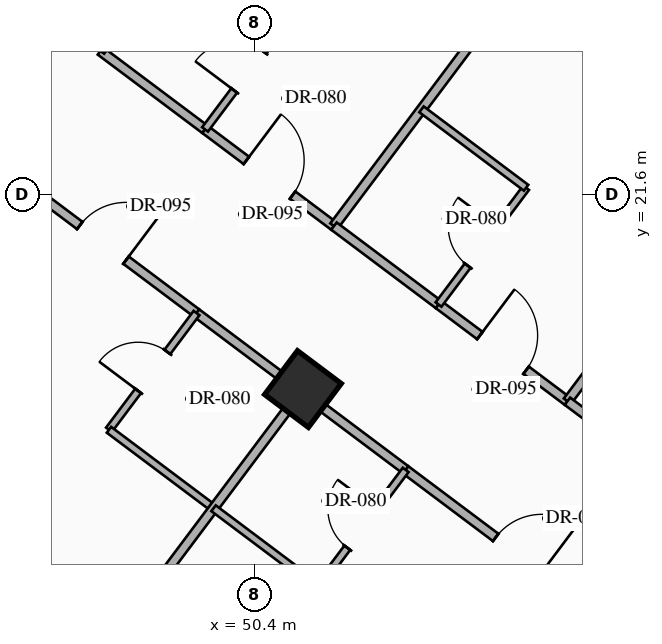
"""IFC4 building model, lengths in metres.
Left out: names, types, materials, properties, quantities, classifications, styles, units other than length and angle.
Written with IfcOpenShell. Run it as: python <this file> out.ifc"""

import sys

from ifc_helpers import new_model, si_unit, direction, frame, frame_2d, origin, origin_2d, place, context, subcontext, project, spatial, rectangle, hollow_rectangle, extrude, element, fill, save


model = new_model("IFC4")
c1 = context("Model", 3, precision=1e-05, world=origin(), true_north=direction((0.0, 1.0)))
c2 = subcontext(c1, "Body", "Model", "MODEL_VIEW")
j1 = project(units=[si_unit("LENGTHUNIT", "METRE"), si_unit("PLANEANGLEUNIT", "RADIAN")], contexts=[c1])
p1 = place(None, origin())
s1 = spatial("IfcSite", under=j1, at=p1, CompositionType="ELEMENT")
p2 = place(p1, origin())
s2 = spatial("IfcBuilding", under=s1, at=p2, CompositionType="ELEMENT")
p3 = place(p2, frame((0.0, 0.0, 74.6)))
s3 = spatial("IfcBuildingStorey", under=s2, at=p3, CompositionType="ELEMENT", Elevation=74.6)
p4 = place(p3, frame((51.2, 18.4, 0.0), z_axis=(0.0, 0.0, 1.0), x_axis=(0.799999996291, -0.600000004945, 0.0)))
e1 = element("IfcColumn", 1, at=p4, inside=s3, PredefinedType="COLUMN", context=c2, shape_type="SweptSolid", body=[
    extrude(hollow_rectangle(XDim=0.9, YDim=0.9, WallThickness=0.036, at=origin_2d()), origin(), (0.0, 0.0, 1.0), 3.35),
])
p5 = place(p3, frame((44.86, 40.73, 0.0), z_axis=(0.0, 0.0, 1.0), x_axis=(0.800006902154, -0.599990797017, 0.0)))
e2 = element("IfcWall", 2, at=p5, inside=s3, PredefinedType="STANDARD", context=c2, shape_type="SweptSolid", body=[
    extrude(rectangle(XDim=29.712, YDim=0.28, at=frame_2d((14.856, 0.0))), origin(), (0.0, 0.0, 1.0), 3.13),
])
p6 = place(p5, frame((14.249, 0.0, 0.0)))
e3 = element("IfcOpeningElement", 3, at=p6, cuts=e2, PredefinedType="OPENING", context=c2, shape_type="SweptSolid", body=[
    extrude(rectangle(XDim=1.1, YDim=2.2, at=frame_2d((0.55, 1.1))), frame((0.0, 0.15, 0.0), z_axis=(0.0, -1.0, 0.0), x_axis=(1.0, 0.0, 0.0)), (0.0, 0.0, 1.0), 0.3),
])
p7 = place(p5, frame((1.612, 0.0, 0.85)))
e4 = element("IfcOpeningElement", 4, at=p7, cuts=e2, PredefinedType="OPENING", context=c2, shape_type="SweptSolid", body=[
    extrude(rectangle(XDim=1.4, YDim=1.8, at=frame_2d((0.7, 0.9))), frame((0.0, 0.15, 0.0), z_axis=(0.0, -1.0, 0.0), x_axis=(1.0, 0.0, 0.0)), (0.0, 0.0, 1.0), 0.3),
])
p8 = place(p5, frame((5.667, 0.0, 0.85)))
e5 = element("IfcOpeningElement", 5, at=p8, cuts=e2, PredefinedType="OPENING", context=c2, shape_type="SweptSolid", body=[
    extrude(rectangle(XDim=1.4, YDim=1.8, at=frame_2d((0.7, 0.9))), frame((0.0, 0.15, 0.0), z_axis=(0.0, -1.0, 0.0), x_axis=(1.0, 0.0, 0.0)), (0.0, 0.0, 1.0), 0.3),
])
p9 = place(p5, frame((9.912, 0.0, 0.85)))
e6 = element("IfcOpeningElement", 6, at=p9, cuts=e2, PredefinedType="OPENING", context=c2, shape_type="SweptSolid", body=[
    extrude(rectangle(XDim=1.4, YDim=1.8, at=frame_2d((0.7, 0.9))), frame((0.0, 0.15, 0.0), z_axis=(0.0, -1.0, 0.0), x_axis=(1.0, 0.0, 0.0)), (0.0, 0.0, 1.0), 0.3),
])
p10 = place(p5, frame((19.528, 0.0, 0.85)))
e7 = element("IfcOpeningElement", 7, at=p10, cuts=e2, PredefinedType="OPENING", context=c2, shape_type="SweptSolid", body=[
    extrude(rectangle(XDim=1.4, YDim=1.8, at=frame_2d((0.7, 0.9))), frame((0.0, 0.15, 0.0), z_axis=(0.0, -1.0, 0.0), x_axis=(1.0, 0.0, 0.0)), (0.0, 0.0, 1.0), 0.3),
])
p11 = place(p5, frame((23.451, 0.0, 0.85)))
e8 = element("IfcOpeningElement", 8, at=p11, cuts=e2, PredefinedType="OPENING", context=c2, shape_type="SweptSolid", body=[
    extrude(rectangle(XDim=1.4, YDim=1.8, at=frame_2d((0.7, 0.9))), frame((0.0, 0.15, 0.0), z_axis=(0.0, -1.0, 0.0), x_axis=(1.0, 0.0, 0.0)), (0.0, 0.0, 1.0), 0.3),
])
p12 = place(p5, frame((27.852, 0.0, 0.85)))
e9 = element("IfcOpeningElement", 9, at=p12, cuts=e2, PredefinedType="OPENING", context=c2, shape_type="SweptSolid", body=[
    extrude(rectangle(XDim=1.4, YDim=1.8, at=frame_2d((0.7, 0.9))), frame((0.0, 0.15, 0.0), z_axis=(0.0, -1.0, 0.0), x_axis=(1.0, 0.0, 0.0)), (0.0, 0.0, 1.0), 0.3),
])
p13 = place(p3, frame((53.318, 2.487, 0.0), z_axis=(0.0, 0.0, 1.0), x_axis=(-0.800004174678, 0.599994433723, 0.0)))
e10 = element("IfcWall", 10, at=p13, inside=s3, PredefinedType="STANDARD", context=c2, shape_type="SweptSolid", body=[
    extrude(rectangle(XDim=35.089, YDim=0.28, at=frame_2d((17.544, 0.0))), origin(), (0.0, 0.0, 1.0), 3.13),
])
p14 = place(p13, frame((1.931, 0.0, 0.85)))
e11 = element("IfcOpeningElement", 11, at=p14, cuts=e10, PredefinedType="OPENING", context=c2, shape_type="SweptSolid", body=[
    extrude(rectangle(XDim=1.4, YDim=1.8, at=frame_2d((0.7, 0.9))), frame((0.0, 0.15, 0.0), z_axis=(0.0, -1.0, 0.0), x_axis=(1.0, 0.0, 0.0)), (0.0, 0.0, 1.0), 0.3),
])
p15 = place(p13, frame((6.819, 0.0, 0.85)))
e12 = element("IfcOpeningElement", 12, at=p15, cuts=e10, PredefinedType="OPENING", context=c2, shape_type="SweptSolid", body=[
    extrude(rectangle(XDim=1.4, YDim=1.8, at=frame_2d((0.7, 0.9))), frame((0.0, 0.15, 0.0), z_axis=(0.0, -1.0, 0.0), x_axis=(1.0, 0.0, 0.0)), (0.0, 0.0, 1.0), 0.3),
])
p16 = place(p13, frame((11.832, 0.0, 0.85)))
e13 = element("IfcOpeningElement", 13, at=p16, cuts=e10, PredefinedType="OPENING", context=c2, shape_type="SweptSolid", body=[
    extrude(rectangle(XDim=1.4, YDim=1.8, at=frame_2d((0.7, 0.9))), frame((0.0, 0.15, 0.0), z_axis=(0.0, -1.0, 0.0), x_axis=(1.0, 0.0, 0.0)), (0.0, 0.0, 1.0), 0.3),
])
p17 = place(p13, frame((17.647, 0.0, 0.85)))
e14 = element("IfcOpeningElement", 14, at=p17, cuts=e10, PredefinedType="OPENING", context=c2, shape_type="SweptSolid", body=[
    extrude(rectangle(XDim=1.4, YDim=1.8, at=frame_2d((0.7, 0.9))), frame((0.0, 0.15, 0.0), z_axis=(0.0, -1.0, 0.0), x_axis=(1.0, 0.0, 0.0)), (0.0, 0.0, 1.0), 0.3),
])
p18 = place(p13, frame((21.857, 0.0, 0.85)))
e15 = element("IfcOpeningElement", 15, at=p18, cuts=e10, PredefinedType="OPENING", context=c2, shape_type="SweptSolid", body=[
    extrude(rectangle(XDim=1.4, YDim=1.8, at=frame_2d((0.7, 0.9))), frame((0.0, 0.15, 0.0), z_axis=(0.0, -1.0, 0.0), x_axis=(1.0, 0.0, 0.0)), (0.0, 0.0, 1.0), 0.3),
])
p19 = place(p13, frame((26.87, 0.0, 0.85)))
e16 = element("IfcOpeningElement", 16, at=p19, cuts=e10, PredefinedType="OPENING", context=c2, shape_type="SweptSolid", body=[
    extrude(rectangle(XDim=1.4, YDim=1.8, at=frame_2d((0.7, 0.9))), frame((0.0, 0.15, 0.0), z_axis=(0.0, -1.0, 0.0), x_axis=(1.0, 0.0, 0.0)), (0.0, 0.0, 1.0), 0.3),
])
p20 = place(p13, frame((31.757, 0.0, 0.85)))
e17 = element("IfcOpeningElement", 17, at=p20, cuts=e10, PredefinedType="OPENING", context=c2, shape_type="SweptSolid", body=[
    extrude(rectangle(XDim=1.4, YDim=1.8, at=frame_2d((0.7, 0.9))), frame((0.0, 0.15, 0.0), z_axis=(0.0, -1.0, 0.0), x_axis=(1.0, 0.0, 0.0)), (0.0, 0.0, 1.0), 0.3),
])
p21 = place(p3, frame((47.87, 23.96, 0.0), z_axis=(0.0, 0.0, 1.0), x_axis=(0.79998637334, -0.60001816845, 0.0)))
e18 = element("IfcWall", 18, at=p21, inside=s3, PredefinedType="PARTITIONING", context=c2, shape_type="SweptSolid", body=[
    extrude(rectangle(XDim=2.15, YDim=0.15, at=frame_2d((1.075, 0.0))), origin(), (0.0, 0.0, 1.0), 2.775),
])
p22 = place(p3, frame((49.59, 22.67, 0.0), z_axis=(0.0, 0.0, 1.0), x_axis=(0.800011056104, -0.599985258246, 0.0)))
e19 = element("IfcWall", 19, at=p22, inside=s3, PredefinedType="PARTITIONING", context=c2, shape_type="SweptSolid", body=[
    extrude(rectangle(XDim=2.65, YDim=0.15, at=frame_2d((1.325, 0.0))), origin(), (0.0, 0.0, 1.0), 2.775),
])
p23 = place(p22, frame((0.85, 0.0, 0.0)))
e20 = element("IfcOpeningElement", 20, at=p23, cuts=e19, PredefinedType="OPENING", context=c2, shape_type="SweptSolid", body=[
    extrude(rectangle(XDim=0.95, YDim=2.15, at=frame_2d((0.475, 1.075))), frame((0.0, 0.085, 0.0), z_axis=(0.0, -1.0, 0.0), x_axis=(1.0, 0.0, 0.0)), (0.0, 0.0, 1.0), 0.17),
])
p24 = place(p3, frame((49.59, 22.67, 0.0), z_axis=(0.0, 0.0, 1.0), x_axis=(0.599951172744, 0.800036618114, 0.0)))
e21 = element("IfcWall", 21, at=p24, inside=s3, PredefinedType="PARTITIONING", context=c2, shape_type="SweptSolid", body=[
    extrude(rectangle(XDim=2.4, YDim=0.12, at=frame_2d((1.2, 0.0))), origin(), (0.0, 0.0, 1.0), 3.13),
])
p25 = place(p24, frame((0.8, 0.0, 0.0)))
e22 = element("IfcOpeningElement", 22, at=p25, cuts=e21, PredefinedType="OPENING", context=c2, shape_type="SweptSolid", body=[
    extrude(rectangle(XDim=0.8, YDim=2.06, at=frame_2d((0.4, 1.03))), frame((0.0, 0.07, 0.0), z_axis=(0.0, -1.0, 0.0), x_axis=(1.0, 0.0, 0.0)), (0.0, 0.0, 1.0), 0.14),
])
for number, where, z_axis, x_axis in (
    (23, (47.87, 23.96, 0.0), (0.0, 0.0, 1.0), (0.6, 0.8, 0.0)),
    (24, (51.71, 21.08, 0.0), (0.0, 0.0, 1.0), (0.6, 0.8, 0.0)),
):
    element("IfcWall", number, at=place(p3, frame(where, z_axis=z_axis, x_axis=x_axis)), inside=s3, PredefinedType="PARTITIONING", context=c2, shape_type="SweptSolid", body=[
        extrude(rectangle(XDim=11.55, YDim=0.15, at=frame_2d((5.775, 0.0))), origin(), (0.0, 0.0, 1.0), 3.13),
    ])
p26 = place(p3, frame((51.71, 21.08, 0.0), z_axis=(0.0, 0.0, 1.0), x_axis=(0.79998637334, -0.60001816845, 0.0)))
e25 = element("IfcWall", 25, at=p26, inside=s3, PredefinedType="PARTITIONING", context=c2, shape_type="SweptSolid", body=[
    extrude(rectangle(XDim=2.15, YDim=0.15, at=frame_2d((1.075, 0.0))), origin(), (0.0, 0.0, 1.0), 2.775),
])
p27 = place(p3, frame((53.43, 19.79, 0.0), z_axis=(0.0, 0.0, 1.0), x_axis=(0.8, -0.6, 0.0)))
e26 = element("IfcWall", 26, at=p27, inside=s3, PredefinedType="PARTITIONING", context=c2, shape_type="SweptSolid", body=[
    extrude(rectangle(XDim=2.65, YDim=0.15, at=frame_2d((1.325, 0.0))), origin(), (0.0, 0.0, 1.0), 2.775),
])
p28 = place(p27, frame((0.85, 0.0, 0.0)))
e27 = element("IfcOpeningElement", 27, at=p28, cuts=e26, PredefinedType="OPENING", context=c2, shape_type="SweptSolid", body=[
    extrude(rectangle(XDim=0.95, YDim=2.15, at=frame_2d((0.475, 1.075))), frame((0.0, 0.085, 0.0), z_axis=(0.0, -1.0, 0.0), x_axis=(1.0, 0.0, 0.0)), (0.0, 0.0, 1.0), 0.17),
])
p29 = place(p3, frame((53.43, 19.79, 0.0), z_axis=(0.0, 0.0, 1.0), x_axis=(0.600065100855, 0.79995117022, 0.0)))
e28 = element("IfcWall", 28, at=p29, inside=s3, PredefinedType="PARTITIONING", context=c2, shape_type="SweptSolid", body=[
    extrude(rectangle(XDim=2.4, YDim=0.12, at=frame_2d((1.2, 0.0))), origin(), (0.0, 0.0, 1.0), 3.13),
])
p30 = place(p29, frame((0.8, 0.0, 0.0)))
e29 = element("IfcOpeningElement", 29, at=p30, cuts=e28, PredefinedType="OPENING", context=c2, shape_type="SweptSolid", body=[
    extrude(rectangle(XDim=0.8, YDim=2.06, at=frame_2d((0.4, 1.03))), frame((0.0, 0.07, 0.0), z_axis=(0.0, -1.0, 0.0), x_axis=(1.0, 0.0, 0.0)), (0.0, 0.0, 1.0), 0.14),
])
p31 = place(p3, frame((53.15, 23.0, 0.0), z_axis=(0.0, 0.0, 1.0), x_axis=(0.800027249606, -0.599963665473, 0.0)))
e30 = element("IfcWall", 30, at=p31, inside=s3, PredefinedType="PARTITIONING", context=c2, shape_type="SweptSolid", body=[
    extrude(rectangle(XDim=2.15, YDim=0.12, at=frame_2d((1.075, 0.0))), origin(), (0.0, 0.0, 1.0), 3.13),
])
p32 = place(p3, frame((55.55, 18.2, 0.0), z_axis=(0.0, 0.0, 1.0), x_axis=(0.599996617946, 0.80000253653, 0.0)))
e31 = element("IfcWall", 31, at=p32, inside=s3, PredefinedType="PARTITIONING", context=c2, shape_type="SweptSolid", body=[
    extrude(rectangle(XDim=11.55, YDim=0.15, at=frame_2d((5.775, 0.0))), origin(), (0.0, 0.0, 1.0), 3.13),
])
p33 = place(p3, frame((55.55, 18.2, 0.0), z_axis=(0.0, 0.0, 1.0), x_axis=(0.79998637334, -0.60001816845, 0.0)))
e32 = element("IfcWall", 32, at=p33, inside=s3, PredefinedType="PARTITIONING", context=c2, shape_type="SweptSolid", body=[
    extrude(rectangle(XDim=2.15, YDim=0.15, at=frame_2d((1.075, 0.0))), origin(), (0.0, 0.0, 1.0), 2.775),
])
p34 = place(p3, frame((46.37, 21.96, 0.0), z_axis=(0.0, 0.0, 1.0), x_axis=(0.799977170108, -0.600030438649, 0.0)))
e33 = element("IfcWall", 33, at=p34, inside=s3, PredefinedType="PARTITIONING", context=c2, shape_type="SweptSolid", body=[
    extrude(rectangle(XDim=3.85, YDim=0.15, at=frame_2d((1.925, 0.0))), origin(), (0.0, 0.0, 1.0), 2.425),
])
p35 = place(p34, frame((1.45, 0.0, 0.0)))
e34 = element("IfcOpeningElement", 34, at=p35, cuts=e33, PredefinedType="OPENING", context=c2, shape_type="SweptSolid", body=[
    extrude(rectangle(XDim=0.95, YDim=2.15, at=frame_2d((0.475, 1.075))), frame((0.0, 0.085, 0.0), z_axis=(0.0, -1.0, 0.0), x_axis=(1.0, 0.0, 0.0)), (0.0, 0.0, 1.0), 0.17),
])
p36 = place(p3, frame((49.45, 19.65, 0.0), z_axis=(0.0, 0.0, 1.0), x_axis=(0.800040880289, -0.59994548908, 0.0)))
e35 = element("IfcWall", 35, at=p36, inside=s3, PredefinedType="PARTITIONING", context=c2, shape_type="SweptSolid", body=[
    extrude(rectangle(XDim=2.15, YDim=0.15, at=frame_2d((1.075, 0.0))), origin(), (0.0, 0.0, 1.0), 2.425),
])
p37 = place(p3, frame((48.01, 17.73, 0.0), z_axis=(0.0, 0.0, 1.0), x_axis=(0.6, 0.8, 0.0)))
e36 = element("IfcWall", 36, at=p37, inside=s3, PredefinedType="PARTITIONING", context=c2, shape_type="SweptSolid", body=[
    extrude(rectangle(XDim=2.4, YDim=0.12, at=frame_2d((1.2, 0.0))), origin(), (0.0, 0.0, 1.0), 3.13),
])
p38 = place(p37, frame((0.8, 0.0, 0.0)))
e37 = element("IfcOpeningElement", 37, at=p38, cuts=e36, PredefinedType="OPENING", context=c2, shape_type="SweptSolid", body=[
    extrude(rectangle(XDim=0.8, YDim=2.06, at=frame_2d((0.4, 1.03))), frame((0.0, 0.07, 0.0), z_axis=(0.0, -1.0, 0.0), x_axis=(1.0, 0.0, 0.0)), (0.0, 0.0, 1.0), 0.14),
])
p39 = place(p3, frame((48.01, 17.73, 0.0), z_axis=(0.0, 0.0, 1.0), x_axis=(0.79998637334, -0.60001816845, 0.0)))
e38 = element("IfcWall", 38, at=p39, inside=s3, PredefinedType="PARTITIONING", context=c2, shape_type="SweptSolid", body=[
    extrude(rectangle(XDim=2.15, YDim=0.12, at=frame_2d((1.075, 0.0))), origin(), (0.0, 0.0, 1.0), 3.13),
])
p40 = place(p3, frame((44.36, 9.28, 0.0), z_axis=(0.0, 0.0, 1.0), x_axis=(0.599986233332, 0.800010324816, 0.0)))
e39 = element("IfcWall", 39, at=p40, inside=s3, PredefinedType="PARTITIONING", context=c2, shape_type="SweptSolid", body=[
    extrude(rectangle(XDim=11.35, YDim=0.15, at=frame_2d((5.675, 0.0))), origin(), (0.0, 0.0, 1.0), 2.425),
])
p41 = place(p3, frame((51.17, 18.36, 0.0), z_axis=(0.0, 0.0, 1.0), x_axis=(0.79998637334, -0.60001816845, 0.0)))
e40 = element("IfcWall", 40, at=p41, inside=s3, PredefinedType="PARTITIONING", context=c2, shape_type="SweptSolid", body=[
    extrude(rectangle(XDim=2.15, YDim=0.15, at=frame_2d((1.075, 0.0))), origin(), (0.0, 0.0, 1.0), 2.425),
])
p42 = place(p3, frame((52.89, 17.07, 0.0), z_axis=(0.0, 0.0, 1.0), x_axis=(0.800012600101, -0.599983199498, 0.0)))
e41 = element("IfcWall", 41, at=p42, inside=s3, PredefinedType="PARTITIONING", context=c2, shape_type="SweptSolid", body=[
    extrude(rectangle(XDim=4.65, YDim=0.15, at=frame_2d((2.325, 0.0))), origin(), (0.0, 0.0, 1.0), 2.425),
])
p43 = place(p42, frame((1.85, 0.0, 0.0)))
e42 = element("IfcOpeningElement", 42, at=p43, cuts=e41, PredefinedType="OPENING", context=c2, shape_type="SweptSolid", body=[
    extrude(rectangle(XDim=0.95, YDim=2.15, at=frame_2d((0.475, 1.075))), frame((0.0, 0.085, 0.0), z_axis=(0.0, -1.0, 0.0), x_axis=(1.0, 0.0, 0.0)), (0.0, 0.0, 1.0), 0.17),
])
p44 = place(p3, frame((51.45, 15.15, 0.0), z_axis=(0.0, 0.0, 1.0), x_axis=(0.599951172744, 0.800036618114, 0.0)))
e43 = element("IfcWall", 43, at=p44, inside=s3, PredefinedType="PARTITIONING", context=c2, shape_type="SweptSolid", body=[
    extrude(rectangle(XDim=2.4, YDim=0.12, at=frame_2d((1.2, 0.0))), origin(), (0.0, 0.0, 1.0), 3.13),
])
p45 = place(p44, frame((0.8, 0.0, 0.0)))
e44 = element("IfcOpeningElement", 44, at=p45, cuts=e43, PredefinedType="OPENING", context=c2, shape_type="SweptSolid", body=[
    extrude(rectangle(XDim=0.8, YDim=2.06, at=frame_2d((0.4, 1.03))), frame((0.0, 0.07, 0.0), z_axis=(0.0, -1.0, 0.0), x_axis=(1.0, 0.0, 0.0)), (0.0, 0.0, 1.0), 0.14),
])
p46 = place(p3, frame((49.73, 16.44, 0.0), z_axis=(0.0, 0.0, 1.0), x_axis=(0.79998637334, -0.60001816845, 0.0)))
e45 = element("IfcWall", 45, at=p46, inside=s3, PredefinedType="PARTITIONING", context=c2, shape_type="SweptSolid", body=[
    extrude(rectangle(XDim=2.15, YDim=0.12, at=frame_2d((1.075, 0.0))), origin(), (0.0, 0.0, 1.0), 3.13),
])
p47 = place(p23, origin())
e46 = element("IfcDoor", 46, at=p47, inside=s3, OperationType="SINGLE_SWING_LEFT", PredefinedType="DOOR", context=c2, shape_type="SweptSolid", body=[
    extrude(rectangle(XDim=0.95, YDim=2.15, at=frame_2d((0.475, 1.075))), frame((0.0, 0.025, 0.0), z_axis=(0.0, -1.0, 0.0), x_axis=(1.0, 0.0, 0.0)), (0.0, 0.0, 1.0), 0.05),
])
fill(e20, e46)
p48 = place(p25, origin())
e47 = element("IfcDoor", 47, at=p48, inside=s3, OperationType="SINGLE_SWING_LEFT", PredefinedType="DOOR", context=c2, shape_type="SweptSolid", body=[
    extrude(rectangle(XDim=0.8, YDim=2.06, at=frame_2d((0.4, 1.03))), frame((0.0, 0.025, 0.0), z_axis=(0.0, -1.0, 0.0), x_axis=(1.0, 0.0, 0.0)), (0.0, 0.0, 1.0), 0.05),
])
fill(e22, e47)
p49 = place(p28, origin())
e48 = element("IfcDoor", 48, at=p49, inside=s3, OperationType="SINGLE_SWING_LEFT", PredefinedType="DOOR", context=c2, shape_type="SweptSolid", body=[
    extrude(rectangle(XDim=0.95, YDim=2.15, at=frame_2d((0.475, 1.075))), frame((0.0, 0.025, 0.0), z_axis=(0.0, -1.0, 0.0), x_axis=(1.0, 0.0, 0.0)), (0.0, 0.0, 1.0), 0.05),
])
fill(e27, e48)
p50 = place(p30, origin())
e49 = element("IfcDoor", 49, at=p50, inside=s3, OperationType="SINGLE_SWING_RIGHT", PredefinedType="DOOR", context=c2, shape_type="SweptSolid", body=[
    extrude(rectangle(XDim=0.8, YDim=2.06, at=frame_2d((0.4, 1.03))), frame((0.0, 0.025, 0.0), z_axis=(0.0, -1.0, 0.0), x_axis=(1.0, 0.0, 0.0)), (0.0, 0.0, 1.0), 0.05),
])
fill(e29, e49)
p51 = place(p35, origin())
e50 = element("IfcDoor", 50, at=p51, inside=s3, OperationType="SINGLE_SWING_RIGHT", PredefinedType="DOOR", context=c2, shape_type="SweptSolid", body=[
    extrude(rectangle(XDim=0.95, YDim=2.15, at=frame_2d((0.475, 1.075))), frame((0.0, 0.025, 0.0), z_axis=(0.0, -1.0, 0.0), x_axis=(1.0, 0.0, 0.0)), (0.0, 0.0, 1.0), 0.05),
])
fill(e34, e50)
p52 = place(p38, origin())
e51 = element("IfcDoor", 51, at=p52, inside=s3, OperationType="SINGLE_SWING_LEFT", PredefinedType="DOOR", context=c2, shape_type="SweptSolid", body=[
    extrude(rectangle(XDim=0.8, YDim=2.06, at=frame_2d((0.4, 1.03))), frame((0.0, 0.025, 0.0), z_axis=(0.0, -1.0, 0.0), x_axis=(1.0, 0.0, 0.0)), (0.0, 0.0, 1.0), 0.05),
])
fill(e37, e51)
p53 = place(p43, origin())
e52 = element("IfcDoor", 52, at=p53, inside=s3, OperationType="SINGLE_SWING_RIGHT", PredefinedType="DOOR", context=c2, shape_type="SweptSolid", body=[
    extrude(rectangle(XDim=0.95, YDim=2.15, at=frame_2d((0.475, 1.075))), frame((0.0, 0.025, 0.0), z_axis=(0.0, -1.0, 0.0), x_axis=(1.0, 0.0, 0.0)), (0.0, 0.0, 1.0), 0.05),
])
fill(e42, e52)
p54 = place(p45, origin())
e53 = element("IfcDoor", 53, at=p54, inside=s3, OperationType="SINGLE_SWING_RIGHT", PredefinedType="DOOR", context=c2, shape_type="SweptSolid", body=[
    extrude(rectangle(XDim=0.8, YDim=2.06, at=frame_2d((0.4, 1.03))), frame((0.0, 0.025, 0.0), z_axis=(0.0, -1.0, 0.0), x_axis=(1.0, 0.0, 0.0)), (0.0, 0.0, 1.0), 0.05),
])
fill(e44, e53)
save(model, sys.argv[1])
